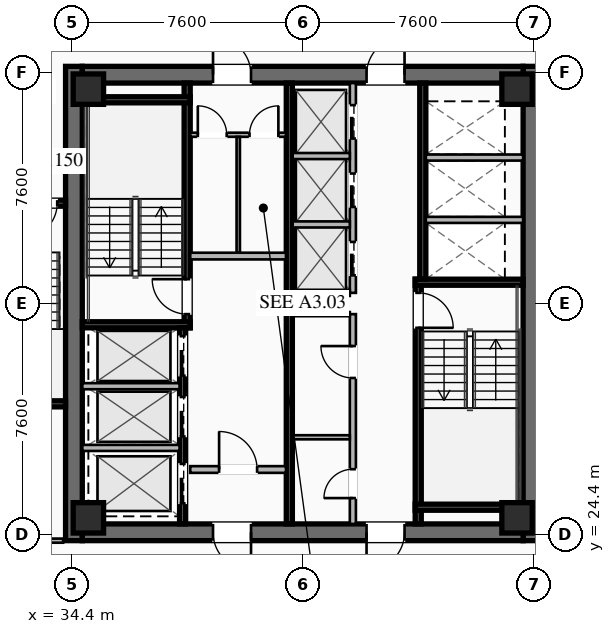
"""IFC4 building model, lengths in metres.
Left out: names, types, materials, properties, quantities, classifications, styles, units other than length and angle.
Written with IfcOpenShell. Run it as: python <this file> out.ifc"""

import sys

from ifc_helpers import new_model, si_unit, direction, frame, frame_2d, origin, origin_2d, place, context, subcontext, project, spatial, rectangle, hollow_rectangle, extrude, element, fill, save


model = new_model("IFC4")
c1 = context("Model", 3, precision=1e-05, world=origin(), true_north=direction((0.0, 1.0)))
c2 = subcontext(c1, "Body", "Model", "MODEL_VIEW")
j1 = project(units=[si_unit("LENGTHUNIT", "METRE"), si_unit("PLANEANGLEUNIT", "RADIAN")], contexts=[c1])
p1 = place(None, origin())
s1 = spatial("IfcSite", under=j1, at=p1, CompositionType="ELEMENT")
p2 = place(p1, origin())
s2 = spatial("IfcBuilding", under=s1, at=p2, CompositionType="ELEMENT")
p3 = place(p2, frame((0.0, 0.0, 167.65)))
s3 = spatial("IfcBuildingStorey", under=s2, at=p3, CompositionType="ELEMENT", Elevation=167.65)
for number, where, z_axis, x_axis in (
    (1, (34.475, 24.2, 0.0), (0.0, 0.0, 1.0), (0.0, 1.0, 0.0)),
    (2, (49.525, 39.8, 0.0), (0.0, 0.0, 1.0), (0.0, -1.0, 0.0)),
):
    element("IfcWall", number, at=place(p3, frame(where, z_axis=z_axis, x_axis=x_axis)), inside=s3, PredefinedType="SHEAR", context=c2, shape_type="SweptSolid", body=[
        extrude(rectangle(XDim=15.6, YDim=0.55, at=frame_2d((7.8, 0.0))), origin(), (0.0, 0.0, 1.0), 3.55),
    ])
p4 = place(p3, frame((49.25, 24.475, 0.0), z_axis=(0.0, 0.0, 1.0), x_axis=(-1.0, 0.0, 0.0)))
e3 = element("IfcWall", 3, at=p4, inside=s3, PredefinedType="SHEAR", context=c2, shape_type="SweptSolid", body=[
    extrude(rectangle(XDim=14.5, YDim=0.55, at=frame_2d((7.25, 0.0))), origin(), (0.0, 0.0, 1.0), 3.55),
])
p5 = place(p4, frame((8.95, 0.0, 0.0)))
e4 = element("IfcOpeningElement", 4, at=p5, cuts=e3, PredefinedType="OPENING", context=c2, shape_type="SweptSolid", body=[
    extrude(rectangle(XDim=1.25, YDim=2.25, at=frame_2d((0.625, 1.125))), frame((0.0, 0.285, 0.0), z_axis=(0.0, -1.0, 0.0), x_axis=(1.0, 0.0, 0.0)), (0.0, 0.0, 1.0), 0.57),
])
p6 = place(p4, frame((3.9, 0.0, 0.0)))
e5 = element("IfcOpeningElement", 5, at=p6, cuts=e3, PredefinedType="OPENING", context=c2, shape_type="SweptSolid", body=[
    extrude(rectangle(XDim=1.25, YDim=2.25, at=frame_2d((0.625, 1.125))), frame((0.0, 0.285, 0.0), z_axis=(0.0, -1.0, 0.0), x_axis=(1.0, 0.0, 0.0)), (0.0, 0.0, 1.0), 0.57),
])
p7 = place(p3, frame((34.75, 39.525, 0.0), z_axis=(0.0, 0.0, 1.0), x_axis=(1.0, 0.0, 0.0)))
e6 = element("IfcWall", 6, at=p7, inside=s3, PredefinedType="SHEAR", context=c2, shape_type="SweptSolid", body=[
    extrude(rectangle(XDim=14.5, YDim=0.55, at=frame_2d((7.25, 0.0))), origin(), (0.0, 0.0, 1.0), 3.55),
])
p8 = place(p7, frame((4.3, 0.0, 0.0)))
e7 = element("IfcOpeningElement", 7, at=p8, cuts=e6, PredefinedType="OPENING", context=c2, shape_type="SweptSolid", body=[
    extrude(rectangle(XDim=1.25, YDim=2.25, at=frame_2d((0.625, 1.125))), frame((0.0, 0.285, 0.0), z_axis=(0.0, -1.0, 0.0), x_axis=(1.0, 0.0, 0.0)), (0.0, 0.0, 1.0), 0.57),
])
p9 = place(p7, frame((9.35, 0.0, 0.0)))
e8 = element("IfcOpeningElement", 8, at=p9, cuts=e6, PredefinedType="OPENING", context=c2, shape_type="SweptSolid", body=[
    extrude(rectangle(XDim=1.25, YDim=2.25, at=frame_2d((0.625, 1.125))), frame((0.0, 0.285, 0.0), z_axis=(0.0, -1.0, 0.0), x_axis=(1.0, 0.0, 0.0)), (0.0, 0.0, 1.0), 0.57),
])
for number, where, z_axis, x_axis in (
    (9, (34.95, 24.95, 0.0), (0.0, 0.0, 1.0), (1.0, 0.0, 0.0)),
    (10, (49.05, 24.95, 0.0), (0.0, 0.0, 1.0), (1.0, 0.0, 0.0)),
    (11, (49.05, 39.05, 0.0), (0.0, 0.0, 1.0), (1.0, 0.0, 0.0)),
    (12, (34.95, 39.05, 0.0), (0.0, 0.0, 1.0), (1.0, 0.0, 0.0)),
):
    element("IfcColumn", number, at=place(p3, frame(where, z_axis=z_axis, x_axis=x_axis)), inside=s3, PredefinedType="COLUMN", context=c2, shape_type="SweptSolid", body=[
        extrude(hollow_rectangle(XDim=1.0, YDim=1.0, WallThickness=0.04, at=origin_2d()), origin(), (0.0, 0.0, 1.0), 3.37),
    ])
p10 = place(p3, frame((38.2, 31.2, 0.0), z_axis=(0.0, 0.0, 1.0), x_axis=(0.0, 1.0, 0.0)))
e13 = element("IfcWall", 13, at=p10, inside=s3, PredefinedType="SHEAR", context=c2, shape_type="SweptSolid", body=[
    extrude(rectangle(XDim=8.05, YDim=0.2, at=frame_2d((4.025, 0.0))), origin(), (0.0, 0.0, 1.0), 3.37),
])
p11 = place(p10, frame((0.45, 0.0, 0.0)))
e14 = element("IfcOpeningElement", 14, at=p11, cuts=e13, PredefinedType="OPENING", context=c2, shape_type="SweptSolid", body=[
    extrude(rectangle(XDim=1.15, YDim=2.2, at=frame_2d((0.575, 1.1))), frame((0.0, 0.11, 0.0), z_axis=(0.0, -1.0, 0.0), x_axis=(1.0, 0.0, 0.0)), (0.0, 0.0, 1.0), 0.22),
])
for number, where, z_axis, x_axis in (
    (15, (34.75, 31.3, 0.0), (0.0, 0.0, 1.0), (1.0, 0.0, 0.0)),
    (16, (34.75, 38.7, 0.0), (0.0, 0.0, 1.0), (1.0, 0.0, 0.0)),
):
    element("IfcWall", number, at=place(p3, frame(where, z_axis=z_axis, x_axis=x_axis)), inside=s3, PredefinedType="SHEAR", context=c2, shape_type="SweptSolid", body=[
        extrude(rectangle(XDim=3.55, YDim=0.2, at=frame_2d((1.775, 0.0))), origin(), (0.0, 0.0, 1.0), 3.37),
    ])
p12 = place(p3, frame((45.8, 32.8, 0.0), z_axis=(0.0, 0.0, 1.0), x_axis=(0.0, -1.0, 0.0)))
e17 = element("IfcWall", 17, at=p12, inside=s3, PredefinedType="SHEAR", context=c2, shape_type="SweptSolid", body=[
    extrude(rectangle(XDim=8.05, YDim=0.2, at=frame_2d((4.025, 0.0))), origin(), (0.0, 0.0, 1.0), 3.37),
])
p13 = place(p12, frame((0.45, 0.0, 0.0)))
e18 = element("IfcOpeningElement", 18, at=p13, cuts=e17, PredefinedType="OPENING", context=c2, shape_type="SweptSolid", body=[
    extrude(rectangle(XDim=1.15, YDim=2.2, at=frame_2d((0.575, 1.1))), frame((0.0, 0.11, 0.0), z_axis=(0.0, -1.0, 0.0), x_axis=(1.0, 0.0, 0.0)), (0.0, 0.0, 1.0), 0.22),
])
for number, where, z_axis, x_axis in (
    (19, (45.7, 32.7, 0.0), (0.0, 0.0, 1.0), (1.0, 0.0, 0.0)),
    (20, (45.7, 25.3, 0.0), (0.0, 0.0, 1.0), (1.0, 0.0, 0.0)),
):
    element("IfcWall", number, at=place(p3, frame(where, z_axis=z_axis, x_axis=x_axis)), inside=s3, PredefinedType="SHEAR", context=c2, shape_type="SweptSolid", body=[
        extrude(rectangle(XDim=3.55, YDim=0.2, at=frame_2d((1.775, 0.0))), origin(), (0.0, 0.0, 1.0), 3.37),
    ])
p14 = place(p3, frame((41.56, 24.75, 0.0), z_axis=(0.0, 0.0, 1.0), x_axis=(0.0, 1.0, 0.0)))
e21 = element("IfcWall", 21, at=p14, inside=s3, PredefinedType="SHEAR", context=c2, shape_type="SweptSolid", body=[
    extrude(rectangle(XDim=14.5, YDim=0.2, at=frame_2d((7.25, 0.0))), origin(), (0.0, 0.0, 1.0), 3.37),
])
p15 = place(p3, frame((38.3, 33.56, 0.0), z_axis=(0.0, 0.0, 1.0), x_axis=(1.0, 0.0, 0.0)))
e22 = element("IfcWall", 22, at=p15, inside=s3, PredefinedType="SOLIDWALL", context=c2, shape_type="SweptSolid", body=[
    extrude(rectangle(XDim=3.15, YDim=0.22, at=frame_2d((1.575, 0.0))), origin(), (0.0, 0.0, 1.0), 2.723),
])
p16 = place(p3, frame((38.3, 26.54, 0.0), z_axis=(0.0, 0.0, 1.0), x_axis=(1.0, 0.0, 0.0)))
e23 = element("IfcWall", 23, at=p16, inside=s3, PredefinedType="SOLIDWALL", context=c2, shape_type="SweptSolid", body=[
    extrude(rectangle(XDim=3.15, YDim=0.22, at=frame_2d((1.575, 0.0))), origin(), (0.0, 0.0, 1.0), 2.723),
])
p17 = place(p16, frame((0.95, 0.0, 0.0)))
e24 = element("IfcOpeningElement", 24, at=p17, cuts=e23, PredefinedType="OPENING", context=c2, shape_type="SweptSolid", body=[
    extrude(rectangle(XDim=1.25, YDim=2.25, at=frame_2d((0.625, 1.125))), frame((0.0, 0.12, 0.0), z_axis=(0.0, -1.0, 0.0), x_axis=(1.0, 0.0, 0.0)), (0.0, 0.0, 1.0), 0.24),
])
p18 = place(p3, frame((38.05, 24.75, 0.0), z_axis=(0.0, 0.0, 1.0), x_axis=(0.0, 1.0, 0.0)))
e25 = element("IfcWall", 25, at=p18, inside=s3, PredefinedType="SHEAR", context=c2, shape_type="SweptSolid", body=[
    extrude(rectangle(XDim=6.45, YDim=0.2, at=frame_2d((3.225, 0.0))), origin(), (0.0, 0.0, 1.0), 3.37),
])
p19 = place(p18, frame((4.875, 0.0, 0.0)))
e26 = element("IfcOpeningElement", 26, at=p19, cuts=e25, PredefinedType="OPENING", context=c2, shape_type="SweptSolid", body=[
    extrude(rectangle(XDim=1.3, YDim=2.25, at=frame_2d((0.65, 1.125))), frame((0.0, 0.11, 0.0), z_axis=(0.0, -1.0, 0.0), x_axis=(1.0, 0.0, 0.0)), (0.0, 0.0, 1.0), 0.22),
])
p20 = place(p18, frame((2.875, 0.0, 0.0)))
e27 = element("IfcOpeningElement", 27, at=p20, cuts=e25, PredefinedType="OPENING", context=c2, shape_type="SweptSolid", body=[
    extrude(rectangle(XDim=1.3, YDim=2.25, at=frame_2d((0.65, 1.125))), frame((0.0, 0.11, 0.0), z_axis=(0.0, -1.0, 0.0), x_axis=(1.0, 0.0, 0.0)), (0.0, 0.0, 1.0), 0.22),
])
p21 = place(p18, frame((0.675, 0.0, 0.0)))
e28 = element("IfcOpeningElement", 28, at=p21, cuts=e25, PredefinedType="OPENING", context=c2, shape_type="SweptSolid", body=[
    extrude(rectangle(XDim=1.3, YDim=2.25, at=frame_2d((0.65, 1.125))), frame((0.0, 0.11, 0.0), z_axis=(0.0, -1.0, 0.0), x_axis=(1.0, 0.0, 0.0)), (0.0, 0.0, 1.0), 0.22),
])
for number, where, z_axis, x_axis in (
    (29, (34.75, 27.25, 0.0), (0.0, 0.0, 1.0), (1.0, 0.0, 0.0)),
    (30, (34.75, 29.28, 0.0), (0.0, 0.0, 1.0), (1.0, 0.0, 0.0)),
):
    element("IfcWall", number, at=place(p3, frame(where, z_axis=z_axis, x_axis=x_axis)), inside=s3, PredefinedType="SOLIDWALL", context=c2, shape_type="SweptSolid", body=[
        extrude(rectangle(XDim=3.2, YDim=0.2, at=frame_2d((1.6, 0.0))), origin(), (0.0, 0.0, 1.0), 3.37),
    ])
p22 = place(p3, frame((45.95, 39.25, 0.0), z_axis=(0.0, 0.0, 1.0), x_axis=(0.0, -1.0, 0.0)))
e31 = element("IfcWall", 31, at=p22, inside=s3, PredefinedType="SHEAR", context=c2, shape_type="SweptSolid", body=[
    extrude(rectangle(XDim=6.45, YDim=0.2, at=frame_2d((3.225, 0.0))), origin(), (0.0, 0.0, 1.0), 3.37),
])
for number, where, z_axis, x_axis in (
    (32, (46.05, 34.75, 0.0), (0.0, 0.0, 1.0), (1.0, 0.0, 0.0)),
    (33, (46.05, 36.8, 0.0), (0.0, 0.0, 1.0), (1.0, 0.0, 0.0)),
):
    element("IfcWall", number, at=place(p3, frame(where, z_axis=z_axis, x_axis=x_axis)), inside=s3, PredefinedType="SOLIDWALL", context=c2, shape_type="SweptSolid", body=[
        extrude(rectangle(XDim=3.2, YDim=0.2, at=frame_2d((1.6, 0.0))), origin(), (0.0, 0.0, 1.0), 3.37),
    ])
p23 = place(p3, frame((38.3, 37.55, 0.0), z_axis=(0.0, 0.0, 1.0), x_axis=(1.0, 0.0, 0.0)))
e34 = element("IfcWall", 34, at=p23, inside=s3, PredefinedType="PARTITIONING", context=c2, shape_type="SweptSolid", body=[
    extrude(rectangle(XDim=3.15, YDim=0.135, at=frame_2d((1.575, 0.0))), origin(), (0.0, 0.0, 1.0), 2.723),
])
p24 = place(p23, frame((0.25, 0.0, 0.0)))
e35 = element("IfcOpeningElement", 35, at=p24, cuts=e34, PredefinedType="OPENING", context=c2, shape_type="SweptSolid", body=[
    extrude(rectangle(XDim=0.95, YDim=2.05, at=frame_2d((0.475, 1.025))), frame((0.0, 0.077, 0.0), z_axis=(0.0, -1.0, 0.0), x_axis=(1.0, 0.0, 0.0)), (0.0, 0.0, 1.0), 0.155),
])
p25 = place(p23, frame((1.95, 0.0, 0.0)))
e36 = element("IfcOpeningElement", 36, at=p25, cuts=e34, PredefinedType="OPENING", context=c2, shape_type="SweptSolid", body=[
    extrude(rectangle(XDim=0.95, YDim=2.05, at=frame_2d((0.475, 1.025))), frame((0.0, 0.077, 0.0), z_axis=(0.0, -1.0, 0.0), x_axis=(1.0, 0.0, 0.0)), (0.0, 0.0, 1.0), 0.155),
])
p26 = place(p3, frame((39.88, 33.68, 0.0), z_axis=(0.0, 0.0, 1.0), x_axis=(0.0, 1.0, 0.0)))
e37 = element("IfcWall", 37, at=p26, inside=s3, PredefinedType="PARTITIONING", context=c2, shape_type="SweptSolid", body=[
    extrude(rectangle(XDim=3.8, YDim=0.11, at=frame_2d((1.9, 0.0))), origin(), (0.0, 0.0, 1.0), 2.723),
])
p27 = place(p3, frame((43.65, 24.75, 0.0), z_axis=(0.0, 0.0, 1.0), x_axis=(0.0, 1.0, 0.0)))
e38 = element("IfcWall", 38, at=p27, inside=s3, PredefinedType="SOLIDWALL", context=c2, shape_type="SweptSolid", body=[
    extrude(rectangle(XDim=6.9, YDim=0.2, at=frame_2d((3.45, 0.0))), origin(), (0.0, 0.0, 1.0), 2.723),
])
p28 = place(p27, frame((0.85, 0.0, 0.0)))
e39 = element("IfcOpeningElement", 39, at=p28, cuts=e38, PredefinedType="OPENING", context=c2, shape_type="SweptSolid", body=[
    extrude(rectangle(XDim=0.95, YDim=2.05, at=frame_2d((0.475, 1.025))), frame((0.0, 0.11, 0.0), z_axis=(0.0, -1.0, 0.0), x_axis=(1.0, 0.0, 0.0)), (0.0, 0.0, 1.0), 0.22),
])
p29 = place(p27, frame((4.8, 0.0, 0.0)))
e40 = element("IfcOpeningElement", 40, at=p29, cuts=e38, PredefinedType="OPENING", context=c2, shape_type="SweptSolid", body=[
    extrude(rectangle(XDim=1.05, YDim=2.2, at=frame_2d((0.525, 1.1))), frame((0.0, 0.11, 0.0), z_axis=(0.0, -1.0, 0.0), x_axis=(1.0, 0.0, 0.0)), (0.0, 0.0, 1.0), 0.22),
])
for number, where, z_axis, x_axis in (
    (41, (41.67, 31.65, 0.0), (0.0, 0.0, 1.0), (1.0, 0.0, 0.0)),
    (42, (41.67, 27.6, 0.0), (0.0, 0.0, 1.0), (1.0, 0.0, 0.0)),
):
    element("IfcWall", number, at=place(p3, frame(where, z_axis=z_axis, x_axis=x_axis)), inside=s3, PredefinedType="PARTITIONING", context=c2, shape_type="SweptSolid", body=[
        extrude(rectangle(XDim=1.88, YDim=0.135, at=frame_2d((0.94, 0.0))), origin(), (0.0, 0.0, 1.0), 2.723),
    ])
p30 = place(p3, frame((43.65, 32.35, 0.0), z_axis=(0.0, 0.0, 1.0), x_axis=(0.0, 1.0, 0.0)))
e43 = element("IfcWall", 43, at=p30, inside=s3, PredefinedType="SOLIDWALL", context=c2, shape_type="SweptSolid", body=[
    extrude(rectangle(XDim=6.9, YDim=0.2, at=frame_2d((3.45, 0.0))), origin(), (0.0, 0.0, 1.0), 3.37),
])
p31 = place(p30, frame((0.575, 0.0, 0.0)))
e44 = element("IfcOpeningElement", 44, at=p31, cuts=e43, PredefinedType="OPENING", context=c2, shape_type="SweptSolid", body=[
    extrude(rectangle(XDim=1.1, YDim=2.2, at=frame_2d((0.55, 1.1))), frame((0.0, 0.11, 0.0), z_axis=(0.0, -1.0, 0.0), x_axis=(1.0, 0.0, 0.0)), (0.0, 0.0, 1.0), 0.22),
])
p32 = place(p30, frame((2.825, 0.0, 0.0)))
e45 = element("IfcOpeningElement", 45, at=p32, cuts=e43, PredefinedType="OPENING", context=c2, shape_type="SweptSolid", body=[
    extrude(rectangle(XDim=1.1, YDim=2.2, at=frame_2d((0.55, 1.1))), frame((0.0, 0.11, 0.0), z_axis=(0.0, -1.0, 0.0), x_axis=(1.0, 0.0, 0.0)), (0.0, 0.0, 1.0), 0.22),
])
p33 = place(p30, frame((5.075, 0.0, 0.0)))
e46 = element("IfcOpeningElement", 46, at=p33, cuts=e43, PredefinedType="OPENING", context=c2, shape_type="SweptSolid", body=[
    extrude(rectangle(XDim=1.1, YDim=2.2, at=frame_2d((0.55, 1.1))), frame((0.0, 0.11, 0.0), z_axis=(0.0, -1.0, 0.0), x_axis=(1.0, 0.0, 0.0)), (0.0, 0.0, 1.0), 0.22),
])
for number, where, z_axis, x_axis in (
    (47, (41.67, 32.35, 0.0), (0.0, 0.0, 1.0), (1.0, 0.0, 0.0)),
    (48, (41.67, 34.6, 0.0), (0.0, 0.0, 1.0), (1.0, 0.0, 0.0)),
    (49, (41.67, 36.85, 0.0), (0.0, 0.0, 1.0), (1.0, 0.0, 0.0)),
):
    element("IfcWall", number, at=place(p3, frame(where, z_axis=z_axis, x_axis=x_axis)), inside=s3, PredefinedType="SOLIDWALL", context=c2, shape_type="SweptSolid", body=[
        extrude(rectangle(XDim=1.88, YDim=0.2, at=frame_2d((0.94, 0.0))), origin(), (0.0, 0.0, 1.0), 3.37),
    ])
p34 = place(p3, frame((34.2, 35.3, 0.0), z_axis=(0.0, 0.0, 1.0), x_axis=(-1.0, 0.0, 0.0)))
e50 = element("IfcWall", 50, at=p34, inside=s3, PredefinedType="SHEAR", context=c2, shape_type="SweptSolid", body=[
    extrude(rectangle(XDim=3.4, YDim=0.2, at=frame_2d((1.7, 0.0))), origin(), (0.0, 0.0, 1.0), 3.37),
])
p35 = place(p34, frame((0.275, 0.0, 0.0)))
e51 = element("IfcOpeningElement", 51, at=p35, cuts=e50, PredefinedType="OPENING", context=c2, shape_type="SweptSolid", body=[
    extrude(rectangle(XDim=1.15, YDim=2.2, at=frame_2d((0.575, 1.1))), frame((0.0, 0.11, 0.0), z_axis=(0.0, -1.0, 0.0), x_axis=(1.0, 0.0, 0.0)), (0.0, 0.0, 1.0), 0.22),
])
p36 = place(p3, frame((30.8, 28.7, 0.0), z_axis=(0.0, 0.0, 1.0), x_axis=(1.0, 0.0, 0.0)))
e52 = element("IfcWall", 52, at=p36, inside=s3, PredefinedType="SHEAR", context=c2, shape_type="SweptSolid", body=[
    extrude(rectangle(XDim=3.4, YDim=0.2, at=frame_2d((1.7, 0.0))), origin(), (0.0, 0.0, 1.0), 3.37),
])
p37 = place(p3, frame((24.32, 24.2, 0.0), z_axis=(0.0, 0.0, 1.0), x_axis=(1.0, 0.0, 0.0)))
e53 = element("IfcWall", 53, at=p37, inside=s3, PredefinedType="PARTITIONING", context=c2, shape_type="SweptSolid", body=[
    extrude(rectangle(XDim=9.8, YDim=0.135, at=frame_2d((4.9, 0.0))), origin(), (0.0, 0.0, 1.0), 2.723),
])
p38 = place(p37, frame((6.805, 0.0, 0.0)))
e54 = element("IfcOpeningElement", 54, at=p38, cuts=e53, PredefinedType="OPENING", context=c2, shape_type="SweptSolid", body=[
    extrude(rectangle(XDim=0.95, YDim=2.05, at=frame_2d((0.475, 1.025))), frame((0.0, 0.077, 0.0), z_axis=(0.0, -1.0, 0.0), x_axis=(1.0, 0.0, 0.0)), (0.0, 0.0, 1.0), 0.155),
])
p39 = place(p8, origin())
e55 = element("IfcDoor", 55, at=p39, inside=s3, OperationType="SINGLE_SWING_LEFT", PredefinedType="DOOR", context=c2, shape_type="SweptSolid", body=[
    extrude(rectangle(XDim=1.25, YDim=2.25, at=frame_2d((0.625, 1.125))), frame((0.0, 0.025, 0.0), z_axis=(0.0, -1.0, 0.0), x_axis=(1.0, 0.0, 0.0)), (0.0, 0.0, 1.0), 0.05),
])
fill(e7, e55)
p40 = place(p9, origin())
e56 = element("IfcDoor", 56, at=p40, inside=s3, OperationType="SINGLE_SWING_RIGHT", PredefinedType="DOOR", context=c2, shape_type="SweptSolid", body=[
    extrude(rectangle(XDim=1.25, YDim=2.25, at=frame_2d((0.625, 1.125))), frame((0.0, 0.025, 0.0), z_axis=(0.0, -1.0, 0.0), x_axis=(1.0, 0.0, 0.0)), (0.0, 0.0, 1.0), 0.05),
])
fill(e8, e56)
p41 = place(p5, origin())
e57 = element("IfcDoor", 57, at=p41, inside=s3, OperationType="SINGLE_SWING_LEFT", PredefinedType="DOOR", context=c2, shape_type="SweptSolid", body=[
    extrude(rectangle(XDim=1.25, YDim=2.25, at=frame_2d((0.625, 1.125))), frame((0.0, 0.025, 0.0), z_axis=(0.0, -1.0, 0.0), x_axis=(1.0, 0.0, 0.0)), (0.0, 0.0, 1.0), 0.05),
])
fill(e4, e57)
p42 = place(p6, origin())
e58 = element("IfcDoor", 58, at=p42, inside=s3, OperationType="SINGLE_SWING_RIGHT", PredefinedType="DOOR", context=c2, shape_type="SweptSolid", body=[
    extrude(rectangle(XDim=1.25, YDim=2.25, at=frame_2d((0.625, 1.125))), frame((0.0, 0.025, 0.0), z_axis=(0.0, -1.0, 0.0), x_axis=(1.0, 0.0, 0.0)), (0.0, 0.0, 1.0), 0.05),
])
fill(e5, e58)
p43 = place(p11, origin())
e59 = element("IfcDoor", 59, at=p43, inside=s3, OperationType="SINGLE_SWING_RIGHT", PredefinedType="DOOR", context=c2, shape_type="SweptSolid", body=[
    extrude(rectangle(XDim=1.15, YDim=2.2, at=frame_2d((0.575, 1.1))), frame((0.0, 0.025, 0.0), z_axis=(0.0, -1.0, 0.0), x_axis=(1.0, 0.0, 0.0)), (0.0, 0.0, 1.0), 0.05),
])
fill(e14, e59)
p44 = place(p13, origin())
e60 = element("IfcDoor", 60, at=p44, inside=s3, OperationType="SINGLE_SWING_RIGHT", PredefinedType="DOOR", context=c2, shape_type="SweptSolid", body=[
    extrude(rectangle(XDim=1.15, YDim=2.2, at=frame_2d((0.575, 1.1))), frame((0.0, 0.025, 0.0), z_axis=(0.0, -1.0, 0.0), x_axis=(1.0, 0.0, 0.0)), (0.0, 0.0, 1.0), 0.05),
])
fill(e18, e60)
p45 = place(p17, origin())
e61 = element("IfcDoor", 61, at=p45, inside=s3, OperationType="SINGLE_SWING_LEFT", PredefinedType="DOOR", context=c2, shape_type="SweptSolid", body=[
    extrude(rectangle(XDim=1.25, YDim=2.25, at=frame_2d((0.625, 1.125))), frame((0.0, 0.025, 0.0), z_axis=(0.0, -1.0, 0.0), x_axis=(1.0, 0.0, 0.0)), (0.0, 0.0, 1.0), 0.05),
])
fill(e24, e61)
p46 = place(p24, origin())
e62 = element("IfcDoor", 62, at=p46, inside=s3, OperationType="SINGLE_SWING_LEFT", PredefinedType="DOOR", context=c2, shape_type="SweptSolid", body=[
    extrude(rectangle(XDim=0.95, YDim=2.05, at=frame_2d((0.475, 1.025))), frame((0.0, 0.025, 0.0), z_axis=(0.0, -1.0, 0.0), x_axis=(1.0, 0.0, 0.0)), (0.0, 0.0, 1.0), 0.05),
])
fill(e35, e62)
p47 = place(p25, origin())
e63 = element("IfcDoor", 63, at=p47, inside=s3, OperationType="SINGLE_SWING_RIGHT", PredefinedType="DOOR", context=c2, shape_type="SweptSolid", body=[
    extrude(rectangle(XDim=0.95, YDim=2.05, at=frame_2d((0.475, 1.025))), frame((0.0, 0.025, 0.0), z_axis=(0.0, -1.0, 0.0), x_axis=(1.0, 0.0, 0.0)), (0.0, 0.0, 1.0), 0.05),
])
fill(e36, e63)
p48 = place(p28, origin())
e64 = element("IfcDoor", 64, at=p48, inside=s3, OperationType="SINGLE_SWING_LEFT", PredefinedType="DOOR", context=c2, shape_type="SweptSolid", body=[
    extrude(rectangle(XDim=0.95, YDim=2.05, at=frame_2d((0.475, 1.025))), frame((0.0, 0.025, 0.0), z_axis=(0.0, -1.0, 0.0), x_axis=(1.0, 0.0, 0.0)), (0.0, 0.0, 1.0), 0.05),
])
fill(e39, e64)
p49 = place(p29, origin())
e65 = element("IfcDoor", 65, at=p49, inside=s3, OperationType="SINGLE_SWING_RIGHT", PredefinedType="DOOR", context=c2, shape_type="SweptSolid", body=[
    extrude(rectangle(XDim=1.05, YDim=2.2, at=frame_2d((0.525, 1.1))), frame((0.0, 0.025, 0.0), z_axis=(0.0, -1.0, 0.0), x_axis=(1.0, 0.0, 0.0)), (0.0, 0.0, 1.0), 0.05),
])
fill(e40, e65)
p50 = place(p35, origin())
e66 = element("IfcDoor", 66, at=p50, inside=s3, OperationType="SINGLE_SWING_RIGHT", PredefinedType="DOOR", context=c2, shape_type="SweptSolid", body=[
    extrude(rectangle(XDim=1.15, YDim=2.2, at=frame_2d((0.575, 1.1))), frame((0.0, 0.025, 0.0), z_axis=(0.0, -1.0, 0.0), x_axis=(1.0, 0.0, 0.0)), (0.0, 0.0, 1.0), 0.05),
])
fill(e51, e66)
p51 = place(p19, origin())
e67 = element("IfcDoor", 67, at=p51, inside=s3, OperationType="SLIDING_TO_LEFT", PredefinedType="DOOR", context=c2, shape_type="SweptSolid", body=[
    extrude(rectangle(XDim=1.3, YDim=2.25, at=frame_2d((0.65, 1.125))), frame((0.0, 0.025, 0.0), z_axis=(0.0, -1.0, 0.0), x_axis=(1.0, 0.0, 0.0)), (0.0, 0.0, 1.0), 0.05),
])
fill(e26, e67)
p52 = place(p20, origin())
e68 = element("IfcDoor", 68, at=p52, inside=s3, OperationType="SLIDING_TO_LEFT", PredefinedType="DOOR", context=c2, shape_type="SweptSolid", body=[
    extrude(rectangle(XDim=1.3, YDim=2.25, at=frame_2d((0.65, 1.125))), frame((0.0, 0.025, 0.0), z_axis=(0.0, -1.0, 0.0), x_axis=(1.0, 0.0, 0.0)), (0.0, 0.0, 1.0), 0.05),
])
fill(e27, e68)
p53 = place(p21, origin())
e69 = element("IfcDoor", 69, at=p53, inside=s3, OperationType="SLIDING_TO_LEFT", PredefinedType="DOOR", context=c2, shape_type="SweptSolid", body=[
    extrude(rectangle(XDim=1.3, YDim=2.25, at=frame_2d((0.65, 1.125))), frame((0.0, 0.025, 0.0), z_axis=(0.0, -1.0, 0.0), x_axis=(1.0, 0.0, 0.0)), (0.0, 0.0, 1.0), 0.05),
])
fill(e28, e69)
p54 = place(p31, origin())
e70 = element("IfcDoor", 70, at=p54, inside=s3, OperationType="SLIDING_TO_LEFT", PredefinedType="DOOR", context=c2, shape_type="SweptSolid", body=[
    extrude(rectangle(XDim=1.1, YDim=2.2, at=frame_2d((0.55, 1.1))), frame((0.0, 0.025, 0.0), z_axis=(0.0, -1.0, 0.0), x_axis=(1.0, 0.0, 0.0)), (0.0, 0.0, 1.0), 0.05),
])
fill(e44, e70)
p55 = place(p32, origin())
e71 = element("IfcDoor", 71, at=p55, inside=s3, OperationType="SLIDING_TO_LEFT", PredefinedType="DOOR", context=c2, shape_type="SweptSolid", body=[
    extrude(rectangle(XDim=1.1, YDim=2.2, at=frame_2d((0.55, 1.1))), frame((0.0, 0.025, 0.0), z_axis=(0.0, -1.0, 0.0), x_axis=(1.0, 0.0, 0.0)), (0.0, 0.0, 1.0), 0.05),
])
fill(e45, e71)
p56 = place(p33, origin())
e72 = element("IfcDoor", 72, at=p56, inside=s3, OperationType="SLIDING_TO_LEFT", PredefinedType="DOOR", context=c2, shape_type="SweptSolid", body=[
    extrude(rectangle(XDim=1.1, YDim=2.2, at=frame_2d((0.55, 1.1))), frame((0.0, 0.025, 0.0), z_axis=(0.0, -1.0, 0.0), x_axis=(1.0, 0.0, 0.0)), (0.0, 0.0, 1.0), 0.05),
])
fill(e46, e72)
save(model, sys.argv[1])
